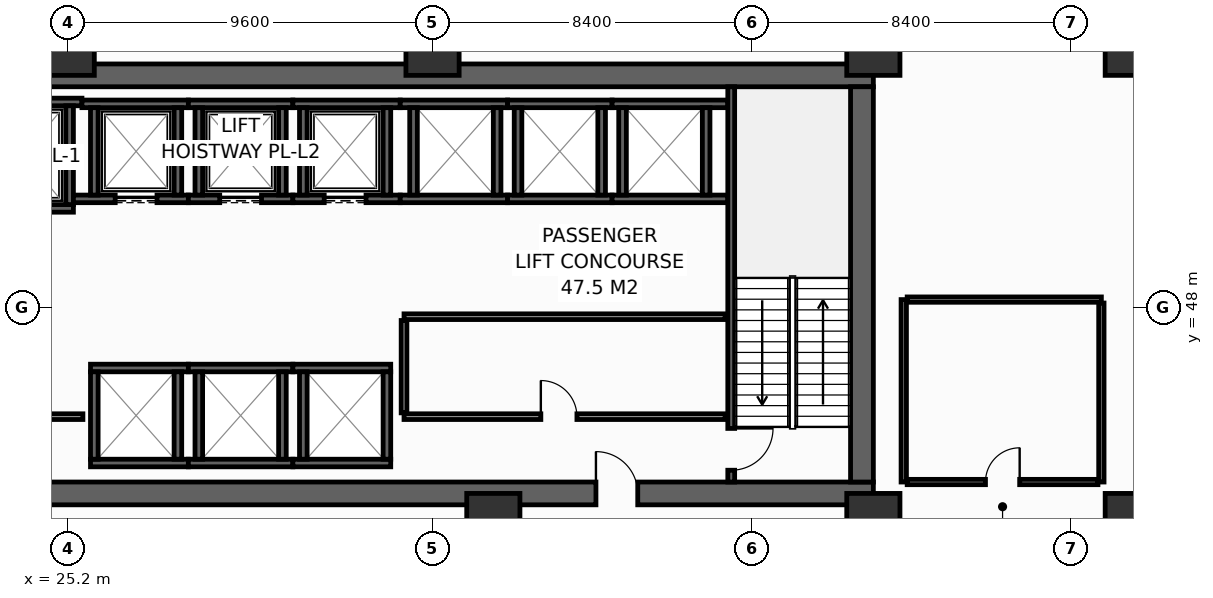
"""IFC4 building model, lengths in metres.
Left out: names, types, materials, properties, quantities, classifications, styles, units other than length and angle.
Written with IfcOpenShell. Run it as: python <this file> out.ifc"""

import sys

from ifc_helpers import new_model, si_unit, direction, frame, frame_2d, origin, origin_2d, place, context, subcontext, project, spatial, rectangle, hollow_rectangle, extrude, element, fill, save


model = new_model("IFC4")
c1 = context("Model", 3, precision=1e-05, world=origin(), true_north=direction((0.0, 1.0)))
c2 = subcontext(c1, "Body", "Model", "MODEL_VIEW")
j1 = project(units=[si_unit("LENGTHUNIT", "METRE"), si_unit("PLANEANGLEUNIT", "RADIAN")], contexts=[c1])
p1 = place(None, origin())
s1 = spatial("IfcSite", under=j1, at=p1, CompositionType="ELEMENT")
p2 = place(p1, origin())
s2 = spatial("IfcBuilding", under=s1, at=p2, CompositionType="ELEMENT")
p3 = place(p2, frame((0.0, 0.0, 6.0)))
s3 = spatial("IfcBuildingStorey", under=s2, at=p3, CompositionType="ELEMENT", Elevation=6.0)
p4 = place(p3, frame((13.5, 43.1, 0.0), z_axis=(0.0, 0.0, 1.0), x_axis=(1.0, 0.0, 0.0)))
e1 = element("IfcWall", 1, at=p4, inside=s3, PredefinedType="SHEAR", context=c2, shape_type="SweptSolid", body=[
    extrude(rectangle(XDim=32.9, YDim=0.6, at=frame_2d((16.45, 0.0))), origin(), (0.0, 0.0, 1.0), 5.1),
])
p5 = place(p4, frame((5.4, 0.0, 0.0)))
e2 = element("IfcOpeningElement", 2, at=p5, cuts=e1, PredefinedType="OPENING", context=c2, shape_type="SweptSolid", body=[
    extrude(rectangle(XDim=1.1, YDim=2.15, at=frame_2d((0.55, 1.075))), frame((0.0, 0.31, 0.0), z_axis=(0.0, -1.0, 0.0), x_axis=(1.0, 0.0, 0.0)), (0.0, 0.0, 1.0), 0.62),
])
p6 = place(p4, frame((25.6, 0.0, 0.0)))
e3 = element("IfcOpeningElement", 3, at=p6, cuts=e1, PredefinedType="OPENING", context=c2, shape_type="SweptSolid", body=[
    extrude(rectangle(XDim=1.1, YDim=2.15, at=frame_2d((0.55, 1.075))), frame((0.0, 0.31, 0.0), z_axis=(0.0, -1.0, 0.0), x_axis=(1.0, 0.0, 0.0)), (0.0, 0.0, 1.0), 0.62),
])
p7 = place(p3, frame((13.5, 54.1, 0.0), z_axis=(0.0, 0.0, 1.0), x_axis=(1.0, 0.0, 0.0)))
e4 = element("IfcWall", 4, at=p7, inside=s3, PredefinedType="SHEAR", context=c2, shape_type="SweptSolid", body=[
    extrude(rectangle(XDim=32.9, YDim=0.6, at=frame_2d((16.45, 0.0))), origin(), (0.0, 0.0, 1.0), 5.1),
])
p8 = place(p3, frame((46.1, 43.4, 0.0), z_axis=(0.0, 0.0, 1.0), x_axis=(0.0, 1.0, 0.0)))
e5 = element("IfcWall", 5, at=p8, inside=s3, PredefinedType="SHEAR", context=c2, shape_type="SweptSolid", body=[
    extrude(rectangle(XDim=10.4, YDim=0.6, at=frame_2d((5.2, 0.0))), origin(), (0.0, 0.0, 1.0), 5.1),
])
for number, where, z_axis, x_axis in (
    (6, (25.2, 54.8, 0.0), (0.0, 0.0, 1.0), (1.0, 0.0, 0.0)),
    (7, (34.8, 54.8, 0.0), (0.0, 0.0, 1.0), (1.0, 0.0, 0.0)),
    (8, (46.4, 54.8, 0.0), (0.0, 0.0, 1.0), (1.0, 0.0, 0.0)),
    (9, (53.2, 54.8, 0.0), (0.0, 0.0, 1.0), (1.0, 0.0, 0.0)),
    (10, (36.4, 42.4, 0.0), (0.0, 0.0, 1.0), (1.0, 0.0, 0.0)),
    (11, (46.4, 42.4, 0.0), (0.0, 0.0, 1.0), (1.0, 0.0, 0.0)),
    (12, (53.2, 42.4, 0.0), (0.0, 0.0, 1.0), (1.0, 0.0, 0.0)),
):
    element("IfcColumn", number, at=place(p3, frame(where, z_axis=z_axis, x_axis=x_axis)), inside=s3, PredefinedType="COLUMN", context=c2, shape_type="SweptSolid", body=[
        extrude(hollow_rectangle(XDim=1.4, YDim=1.4, WallThickness=0.065, at=origin_2d()), origin(), (0.0, 0.0, 1.0), 5.4),
    ])
p9 = place(p3, frame((22.5, 50.6, 0.0), z_axis=(0.0, 0.0, 1.0), x_axis=(1.0, 0.0, 0.0)))
e13 = element("IfcWall", 13, at=p9, inside=s3, PredefinedType="SHEAR", context=c2, shape_type="SweptSolid", body=[
    extrude(rectangle(XDim=2.85, YDim=0.2, at=frame_2d((1.425, 0.0))), origin(), (0.0, 0.0, 1.0), 5.1),
])
p10 = place(p9, frame((0.925, 0.0, 0.0)))
e14 = element("IfcOpeningElement", 14, at=p10, cuts=e13, PredefinedType="OPENING", context=c2, shape_type="SweptSolid", body=[
    extrude(rectangle(XDim=1.25, YDim=2.3, at=frame_2d((0.625, 1.15))), frame((0.0, 0.11, 0.0), z_axis=(0.0, -1.0, 0.0), x_axis=(1.0, 0.0, 0.0)), (0.0, 0.0, 1.0), 0.22),
])
p11 = place(p3, frame((22.5, 53.4, 0.0), z_axis=(0.0, 0.0, 1.0), x_axis=(1.0, 0.0, 0.0)))
e15 = element("IfcWall", 15, at=p11, inside=s3, PredefinedType="SHEAR", context=c2, shape_type="SweptSolid", body=[
    extrude(rectangle(XDim=3.075, YDim=0.2, at=frame_2d((1.538, 0.0))), origin(), (0.0, 0.0, 1.0), 5.1),
])
p12 = place(p3, frame((25.25, 50.7, 0.0), z_axis=(0.0, 0.0, 1.0), x_axis=(0.0, 1.0, 0.0)))
e16 = element("IfcWall", 16, at=p12, inside=s3, PredefinedType="SHEAR", context=c2, shape_type="SweptSolid", body=[
    extrude(rectangle(XDim=2.6, YDim=0.2, at=frame_2d((1.3, 0.0))), origin(), (0.0, 0.0, 1.0), 5.1),
])
p13 = place(p3, frame((25.35, 50.85, 0.0), z_axis=(0.0, 0.0, 1.0), x_axis=(1.0, 0.0, 0.0)))
e17 = element("IfcWall", 17, at=p13, inside=s3, PredefinedType="SHEAR", context=c2, shape_type="SweptSolid", body=[
    extrude(rectangle(XDim=3.025, YDim=0.2, at=frame_2d((1.512, 0.0))), origin(), (0.0, 0.0, 1.0), 5.1),
])
p14 = place(p13, frame((1.1, 0.0, 0.0)))
e18 = element("IfcOpeningElement", 18, at=p14, cuts=e17, PredefinedType="OPENING", context=c2, shape_type="SweptSolid", body=[
    extrude(rectangle(XDim=1.1, YDim=2.2, at=frame_2d((0.55, 1.1))), frame((0.0, 0.11, 0.0), z_axis=(0.0, -1.0, 0.0), x_axis=(1.0, 0.0, 0.0)), (0.0, 0.0, 1.0), 0.22),
])
p15 = place(p3, frame((25.575, 53.35, 0.0), z_axis=(0.0, 0.0, 1.0), x_axis=(1.0, 0.0, 0.0)))
e19 = element("IfcWall", 19, at=p15, inside=s3, PredefinedType="SHEAR", context=c2, shape_type="SweptSolid", body=[
    extrude(rectangle(XDim=2.8, YDim=0.2, at=frame_2d((1.4, 0.0))), origin(), (0.0, 0.0, 1.0), 5.1),
])
for number, where, z_axis, x_axis in (
    (20, (25.9, 50.95, 0.0), (0.0, 0.0, 1.0), (0.0, 1.0, 0.0)),
    (21, (28.1, 50.95, 0.0), (0.0, 0.0, 1.0), (0.0, 1.0, 0.0)),
):
    element("IfcWall", number, at=place(p3, frame(where, z_axis=z_axis, x_axis=x_axis)), inside=s3, PredefinedType="SHEAR", context=c2, shape_type="SweptSolid", body=[
        extrude(rectangle(XDim=2.3, YDim=0.2, at=frame_2d((1.15, 0.0))), origin(), (0.0, 0.0, 1.0), 5.1),
    ])
p16 = place(p3, frame((28.375, 50.85, 0.0), z_axis=(0.0, 0.0, 1.0), x_axis=(1.0, 0.0, 0.0)))
e22 = element("IfcWall", 22, at=p16, inside=s3, PredefinedType="SHEAR", context=c2, shape_type="SweptSolid", body=[
    extrude(rectangle(XDim=2.75, YDim=0.2, at=frame_2d((1.375, 0.0))), origin(), (0.0, 0.0, 1.0), 5.1),
])
p17 = place(p16, frame((0.825, 0.0, 0.0)))
e23 = element("IfcOpeningElement", 23, at=p17, cuts=e22, PredefinedType="OPENING", context=c2, shape_type="SweptSolid", body=[
    extrude(rectangle(XDim=1.1, YDim=2.2, at=frame_2d((0.55, 1.1))), frame((0.0, 0.11, 0.0), z_axis=(0.0, -1.0, 0.0), x_axis=(1.0, 0.0, 0.0)), (0.0, 0.0, 1.0), 0.22),
])
p18 = place(p3, frame((28.375, 53.35, 0.0), z_axis=(0.0, 0.0, 1.0), x_axis=(1.0, 0.0, 0.0)))
e24 = element("IfcWall", 24, at=p18, inside=s3, PredefinedType="SHEAR", context=c2, shape_type="SweptSolid", body=[
    extrude(rectangle(XDim=2.75, YDim=0.2, at=frame_2d((1.375, 0.0))), origin(), (0.0, 0.0, 1.0), 5.1),
])
for number, where, z_axis, x_axis in (
    (25, (28.65, 50.95, 0.0), (0.0, 0.0, 1.0), (0.0, 1.0, 0.0)),
    (26, (30.85, 50.95, 0.0), (0.0, 0.0, 1.0), (0.0, 1.0, 0.0)),
):
    element("IfcWall", number, at=place(p3, frame(where, z_axis=z_axis, x_axis=x_axis)), inside=s3, PredefinedType="SHEAR", context=c2, shape_type="SweptSolid", body=[
        extrude(rectangle(XDim=2.3, YDim=0.2, at=frame_2d((1.15, 0.0))), origin(), (0.0, 0.0, 1.0), 5.1),
    ])
p19 = place(p3, frame((31.125, 50.85, 0.0), z_axis=(0.0, 0.0, 1.0), x_axis=(1.0, 0.0, 0.0)))
e27 = element("IfcWall", 27, at=p19, inside=s3, PredefinedType="SHEAR", context=c2, shape_type="SweptSolid", body=[
    extrude(rectangle(XDim=2.825, YDim=0.2, at=frame_2d((1.413, 0.0))), origin(), (0.0, 0.0, 1.0), 5.1),
])
p20 = place(p19, frame((0.825, 0.0, 0.0)))
e28 = element("IfcOpeningElement", 28, at=p20, cuts=e27, PredefinedType="OPENING", context=c2, shape_type="SweptSolid", body=[
    extrude(rectangle(XDim=1.1, YDim=2.2, at=frame_2d((0.55, 1.1))), frame((0.0, 0.11, 0.0), z_axis=(0.0, -1.0, 0.0), x_axis=(1.0, 0.0, 0.0)), (0.0, 0.0, 1.0), 0.22),
])
p21 = place(p3, frame((31.125, 53.35, 0.0), z_axis=(0.0, 0.0, 1.0), x_axis=(1.0, 0.0, 0.0)))
e29 = element("IfcWall", 29, at=p21, inside=s3, PredefinedType="SHEAR", context=c2, shape_type="SweptSolid", body=[
    extrude(rectangle(XDim=2.825, YDim=0.2, at=frame_2d((1.413, 0.0))), origin(), (0.0, 0.0, 1.0), 5.1),
])
for number, where, z_axis, x_axis in (
    (30, (31.4, 50.95, 0.0), (0.0, 0.0, 1.0), (0.0, 1.0, 0.0)),
    (31, (33.6, 50.95, 0.0), (0.0, 0.0, 1.0), (0.0, 1.0, 0.0)),
):
    element("IfcWall", number, at=place(p3, frame(where, z_axis=z_axis, x_axis=x_axis)), inside=s3, PredefinedType="SHEAR", context=c2, shape_type="SweptSolid", body=[
        extrude(rectangle(XDim=2.3, YDim=0.2, at=frame_2d((1.15, 0.0))), origin(), (0.0, 0.0, 1.0), 5.1),
    ])
for number, where, z_axis, x_axis in (
    (32, (25.8, 43.9, 0.0), (0.0, 0.0, 1.0), (1.0, 0.0, 0.0)),
    (33, (25.8, 46.4, 0.0), (0.0, 0.0, 1.0), (1.0, 0.0, 0.0)),
):
    element("IfcWall", number, at=place(p3, frame(where, z_axis=z_axis, x_axis=x_axis)), inside=s3, PredefinedType="SHEAR", context=c2, shape_type="SweptSolid", body=[
        extrude(rectangle(XDim=2.575, YDim=0.2, at=frame_2d((1.288, 0.0))), origin(), (0.0, 0.0, 1.0), 5.1),
    ])
for number, where, z_axis, x_axis in (
    (34, (25.9, 44.0, 0.0), (0.0, 0.0, 1.0), (0.0, 1.0, 0.0)),
    (35, (28.1, 44.0, 0.0), (0.0, 0.0, 1.0), (0.0, 1.0, 0.0)),
):
    element("IfcWall", number, at=place(p3, frame(where, z_axis=z_axis, x_axis=x_axis)), inside=s3, PredefinedType="SHEAR", context=c2, shape_type="SweptSolid", body=[
        extrude(rectangle(XDim=2.3, YDim=0.2, at=frame_2d((1.15, 0.0))), origin(), (0.0, 0.0, 1.0), 5.1),
    ])
for number, where, z_axis, x_axis in (
    (36, (28.375, 43.9, 0.0), (0.0, 0.0, 1.0), (1.0, 0.0, 0.0)),
    (37, (28.375, 46.4, 0.0), (0.0, 0.0, 1.0), (1.0, 0.0, 0.0)),
):
    element("IfcWall", number, at=place(p3, frame(where, z_axis=z_axis, x_axis=x_axis)), inside=s3, PredefinedType="SHEAR", context=c2, shape_type="SweptSolid", body=[
        extrude(rectangle(XDim=2.75, YDim=0.2, at=frame_2d((1.375, 0.0))), origin(), (0.0, 0.0, 1.0), 5.1),
    ])
for number, where, z_axis, x_axis in (
    (38, (28.65, 44.0, 0.0), (0.0, 0.0, 1.0), (0.0, 1.0, 0.0)),
    (39, (30.85, 44.0, 0.0), (0.0, 0.0, 1.0), (0.0, 1.0, 0.0)),
):
    element("IfcWall", number, at=place(p3, frame(where, z_axis=z_axis, x_axis=x_axis)), inside=s3, PredefinedType="SHEAR", context=c2, shape_type="SweptSolid", body=[
        extrude(rectangle(XDim=2.3, YDim=0.2, at=frame_2d((1.15, 0.0))), origin(), (0.0, 0.0, 1.0), 5.1),
    ])
for number, where, z_axis, x_axis in (
    (40, (31.125, 43.9, 0.0), (0.0, 0.0, 1.0), (1.0, 0.0, 0.0)),
    (41, (31.125, 46.4, 0.0), (0.0, 0.0, 1.0), (1.0, 0.0, 0.0)),
):
    element("IfcWall", number, at=place(p3, frame(where, z_axis=z_axis, x_axis=x_axis)), inside=s3, PredefinedType="SHEAR", context=c2, shape_type="SweptSolid", body=[
        extrude(rectangle(XDim=2.575, YDim=0.2, at=frame_2d((1.288, 0.0))), origin(), (0.0, 0.0, 1.0), 5.1),
    ])
for number, where, z_axis, x_axis in (
    (42, (31.4, 44.0, 0.0), (0.0, 0.0, 1.0), (0.0, 1.0, 0.0)),
    (43, (33.6, 44.0, 0.0), (0.0, 0.0, 1.0), (0.0, 1.0, 0.0)),
):
    element("IfcWall", number, at=place(p3, frame(where, z_axis=z_axis, x_axis=x_axis)), inside=s3, PredefinedType="SHEAR", context=c2, shape_type="SweptSolid", body=[
        extrude(rectangle(XDim=2.3, YDim=0.2, at=frame_2d((1.15, 0.0))), origin(), (0.0, 0.0, 1.0), 5.1),
    ])
for number, where, z_axis, x_axis in (
    (44, (33.95, 50.85, 0.0), (0.0, 0.0, 1.0), (1.0, 0.0, 0.0)),
    (45, (33.95, 53.35, 0.0), (0.0, 0.0, 1.0), (1.0, 0.0, 0.0)),
):
    element("IfcWall", number, at=place(p3, frame(where, z_axis=z_axis, x_axis=x_axis)), inside=s3, PredefinedType="SHEAR", context=c2, shape_type="SweptSolid", body=[
        extrude(rectangle(XDim=2.825, YDim=0.2, at=frame_2d((1.413, 0.0))), origin(), (0.0, 0.0, 1.0), 5.1),
    ])
for number, where, z_axis, x_axis in (
    (46, (34.3, 50.95, 0.0), (0.0, 0.0, 1.0), (0.0, 1.0, 0.0)),
    (47, (36.5, 50.95, 0.0), (0.0, 0.0, 1.0), (0.0, 1.0, 0.0)),
):
    element("IfcWall", number, at=place(p3, frame(where, z_axis=z_axis, x_axis=x_axis)), inside=s3, PredefinedType="SHEAR", context=c2, shape_type="SweptSolid", body=[
        extrude(rectangle(XDim=2.3, YDim=0.2, at=frame_2d((1.15, 0.0))), origin(), (0.0, 0.0, 1.0), 5.1),
    ])
for number, where, z_axis, x_axis in (
    (48, (36.775, 50.85, 0.0), (0.0, 0.0, 1.0), (1.0, 0.0, 0.0)),
    (49, (36.775, 53.35, 0.0), (0.0, 0.0, 1.0), (1.0, 0.0, 0.0)),
):
    element("IfcWall", number, at=place(p3, frame(where, z_axis=z_axis, x_axis=x_axis)), inside=s3, PredefinedType="SHEAR", context=c2, shape_type="SweptSolid", body=[
        extrude(rectangle(XDim=2.75, YDim=0.2, at=frame_2d((1.375, 0.0))), origin(), (0.0, 0.0, 1.0), 5.1),
    ])
for number, where, z_axis, x_axis in (
    (50, (37.05, 50.95, 0.0), (0.0, 0.0, 1.0), (0.0, 1.0, 0.0)),
    (51, (39.25, 50.95, 0.0), (0.0, 0.0, 1.0), (0.0, 1.0, 0.0)),
):
    element("IfcWall", number, at=place(p3, frame(where, z_axis=z_axis, x_axis=x_axis)), inside=s3, PredefinedType="SHEAR", context=c2, shape_type="SweptSolid", body=[
        extrude(rectangle(XDim=2.3, YDim=0.2, at=frame_2d((1.15, 0.0))), origin(), (0.0, 0.0, 1.0), 5.1),
    ])
for number, where, z_axis, x_axis in (
    (52, (39.525, 50.85, 0.0), (0.0, 0.0, 1.0), (1.0, 0.0, 0.0)),
    (53, (39.525, 53.35, 0.0), (0.0, 0.0, 1.0), (1.0, 0.0, 0.0)),
):
    element("IfcWall", number, at=place(p3, frame(where, z_axis=z_axis, x_axis=x_axis)), inside=s3, PredefinedType="SHEAR", context=c2, shape_type="SweptSolid", body=[
        extrude(rectangle(XDim=3.045, YDim=0.2, at=frame_2d((1.522, 0.0))), origin(), (0.0, 0.0, 1.0), 5.1),
    ])
for number, where, z_axis, x_axis in (
    (54, (39.8, 50.95, 0.0), (0.0, 0.0, 1.0), (0.0, 1.0, 0.0)),
    (55, (42.0, 50.95, 0.0), (0.0, 0.0, 1.0), (0.0, 1.0, 0.0)),
):
    element("IfcWall", number, at=place(p3, frame(where, z_axis=z_axis, x_axis=x_axis)), inside=s3, PredefinedType="SHEAR", context=c2, shape_type="SweptSolid", body=[
        extrude(rectangle(XDim=2.3, YDim=0.2, at=frame_2d((1.15, 0.0))), origin(), (0.0, 0.0, 1.0), 5.1),
    ])
p22 = place(p3, frame((42.66, 53.8, 0.0), z_axis=(0.0, 0.0, 1.0), x_axis=(0.0, -1.0, 0.0)))
e56 = element("IfcWall", 56, at=p22, inside=s3, PredefinedType="SHEAR", context=c2, shape_type="SweptSolid", body=[
    extrude(rectangle(XDim=10.4, YDim=0.18, at=frame_2d((5.2, 0.0))), origin(), (0.0, 0.0, 1.0), 5.1),
])
p23 = place(p22, frame((8.99, 0.0, 0.0)))
e57 = element("IfcOpeningElement", 57, at=p23, cuts=e56, PredefinedType="OPENING", context=c2, shape_type="SweptSolid", body=[
    extrude(rectangle(XDim=1.1, YDim=2.15, at=frame_2d((0.55, 1.075))), frame((0.0, 0.1, 0.0), z_axis=(0.0, -1.0, 0.0), x_axis=(1.0, 0.0, 0.0)), (0.0, 0.0, 1.0), 0.2),
])
p24 = place(p3, frame((22.68, 45.12, 0.0), z_axis=(0.0, 0.0, 1.0), x_axis=(1.0, 0.0, 0.0)))
e58 = element("IfcWall", 58, at=p24, inside=s3, PredefinedType="PARTITIONING", context=c2, shape_type="SweptSolid", body=[
    extrude(rectangle(XDim=2.92, YDim=0.15, at=frame_2d((1.46, 0.0))), origin(), (0.0, 0.0, 1.0), 5.1),
])
p25 = place(p24, frame((0.85, 0.0, 0.0)))
e59 = element("IfcOpeningElement", 59, at=p25, cuts=e58, PredefinedType="OPENING", context=c2, shape_type="SweptSolid", body=[
    extrude(rectangle(XDim=1.1, YDim=2.15, at=frame_2d((0.55, 1.075))), frame((0.0, 0.085, 0.0), z_axis=(0.0, -1.0, 0.0), x_axis=(1.0, 0.0, 0.0)), (0.0, 0.0, 1.0), 0.17),
])
p26 = place(p3, frame((34.05, 45.12, 0.0), z_axis=(0.0, 0.0, 1.0), x_axis=(1.0, 0.0, 0.0)))
e60 = element("IfcWall", 60, at=p26, inside=s3, PredefinedType="PARTITIONING", context=c2, shape_type="SweptSolid", body=[
    extrude(rectangle(XDim=8.45, YDim=0.15, at=frame_2d((4.225, 0.0))), origin(), (0.0, 0.0, 1.0), 5.1),
])
p27 = place(p26, frame((3.6, 0.0, 0.0)))
e61 = element("IfcOpeningElement", 61, at=p27, cuts=e60, PredefinedType="OPENING", context=c2, shape_type="SweptSolid", body=[
    extrude(rectangle(XDim=0.95, YDim=2.15, at=frame_2d((0.475, 1.075))), frame((0.0, 0.085, 0.0), z_axis=(0.0, -1.0, 0.0), x_axis=(1.0, 0.0, 0.0)), (0.0, 0.0, 1.0), 0.17),
])
p28 = place(p3, frame((34.05, 47.75, 0.0), z_axis=(0.0, 0.0, 1.0), x_axis=(1.0, 0.0, 0.0)))
e62 = element("IfcWall", 62, at=p28, inside=s3, PredefinedType="PARTITIONING", context=c2, shape_type="SweptSolid", body=[
    extrude(rectangle(XDim=8.45, YDim=0.15, at=frame_2d((4.225, 0.0))), origin(), (0.0, 0.0, 1.0), 5.1),
])
p29 = place(p3, frame((34.05, 45.22, 0.0), z_axis=(0.0, 0.0, 1.0), x_axis=(0.0, 1.0, 0.0)))
e63 = element("IfcWall", 63, at=p29, inside=s3, PredefinedType="PARTITIONING", context=c2, shape_type="SweptSolid", body=[
    extrude(rectangle(XDim=2.43, YDim=0.15, at=frame_2d((1.215, 0.0))), origin(), (0.0, 0.0, 1.0), 5.1),
])
p30 = place(p3, frame((47.2, 43.4, 0.0), z_axis=(0.0, 0.0, 1.0), x_axis=(0.0, 1.0, 0.0)))
e64 = element("IfcWall", 64, at=p30, inside=s3, PredefinedType="PARTITIONING", context=c2, shape_type="SweptSolid", body=[
    extrude(rectangle(XDim=4.8, YDim=0.14, at=frame_2d((2.4, 0.0))), origin(), (0.0, 0.0, 1.0), 5.1),
])
p31 = place(p3, frame((47.29, 48.2, 0.0), z_axis=(0.0, 0.0, 1.0), x_axis=(1.0, 0.0, 0.0)))
e65 = element("IfcWall", 65, at=p31, inside=s3, PredefinedType="PARTITIONING", context=c2, shape_type="SweptSolid", body=[
    extrude(rectangle(XDim=5.11, YDim=0.14, at=frame_2d((2.555, 0.0))), origin(), (0.0, 0.0, 1.0), 5.1),
])
p32 = place(p3, frame((52.4, 43.4, 0.0), z_axis=(0.0, 0.0, 1.0), x_axis=(0.0, 1.0, 0.0)))
e66 = element("IfcWall", 66, at=p32, inside=s3, PredefinedType="PARTITIONING", context=c2, shape_type="SweptSolid", body=[
    extrude(rectangle(XDim=4.71, YDim=0.14, at=frame_2d((2.355, 0.0))), origin(), (0.0, 0.0, 1.0), 5.1),
])
p33 = place(p3, frame((47.29, 43.4, 0.0), z_axis=(0.0, 0.0, 1.0), x_axis=(1.0, 0.0, 0.0)))
e67 = element("IfcWall", 67, at=p33, inside=s3, PredefinedType="PARTITIONING", context=c2, shape_type="SweptSolid", body=[
    extrude(rectangle(XDim=5.02, YDim=0.14, at=frame_2d((2.51, 0.0))), origin(), (0.0, 0.0, 1.0), 5.1),
])
p34 = place(p33, frame((2.06, 0.0, 0.0)))
e68 = element("IfcOpeningElement", 68, at=p34, cuts=e67, PredefinedType="OPENING", context=c2, shape_type="SweptSolid", body=[
    extrude(rectangle(XDim=0.9, YDim=2.1, at=frame_2d((0.45, 1.05))), frame((0.0, 0.08, 0.0), z_axis=(0.0, -1.0, 0.0), x_axis=(1.0, 0.0, 0.0)), (0.0, 0.0, 1.0), 0.16),
])
p35 = place(p14, origin())
e69 = element("IfcDoor", 69, at=p35, inside=s3, OperationType="SLIDING_TO_LEFT", PredefinedType="DOOR", context=c2, shape_type="SweptSolid", body=[
    extrude(rectangle(XDim=1.1, YDim=2.2, at=frame_2d((0.55, 1.1))), frame((0.0, 0.025, 0.0), z_axis=(0.0, -1.0, 0.0), x_axis=(1.0, 0.0, 0.0)), (0.0, 0.0, 1.0), 0.05),
])
fill(e18, e69)
p36 = place(p17, origin())
e70 = element("IfcDoor", 70, at=p36, inside=s3, OperationType="SLIDING_TO_LEFT", PredefinedType="DOOR", context=c2, shape_type="SweptSolid", body=[
    extrude(rectangle(XDim=1.1, YDim=2.2, at=frame_2d((0.55, 1.1))), frame((0.0, 0.025, 0.0), z_axis=(0.0, -1.0, 0.0), x_axis=(1.0, 0.0, 0.0)), (0.0, 0.0, 1.0), 0.05),
])
fill(e23, e70)
p37 = place(p20, origin())
e71 = element("IfcDoor", 71, at=p37, inside=s3, OperationType="SLIDING_TO_LEFT", PredefinedType="DOOR", context=c2, shape_type="SweptSolid", body=[
    extrude(rectangle(XDim=1.1, YDim=2.2, at=frame_2d((0.55, 1.1))), frame((0.0, 0.025, 0.0), z_axis=(0.0, -1.0, 0.0), x_axis=(1.0, 0.0, 0.0)), (0.0, 0.0, 1.0), 0.05),
])
fill(e28, e71)
p38 = place(p23, origin())
e72 = element("IfcDoor", 72, at=p38, inside=s3, OperationType="SINGLE_SWING_LEFT", PredefinedType="DOOR", context=c2, shape_type="SweptSolid", body=[
    extrude(rectangle(XDim=1.1, YDim=2.15, at=frame_2d((0.55, 1.075))), frame((0.0, 0.025, 0.0), z_axis=(0.0, -1.0, 0.0), x_axis=(1.0, 0.0, 0.0)), (0.0, 0.0, 1.0), 0.05),
])
fill(e57, e72)
p39 = place(p6, origin())
e73 = element("IfcDoor", 73, at=p39, inside=s3, OperationType="SINGLE_SWING_LEFT", PredefinedType="DOOR", context=c2, shape_type="SweptSolid", body=[
    extrude(rectangle(XDim=1.1, YDim=2.15, at=frame_2d((0.55, 1.075))), frame((0.0, 0.025, 0.0), z_axis=(0.0, -1.0, 0.0), x_axis=(1.0, 0.0, 0.0)), (0.0, 0.0, 1.0), 0.05),
])
fill(e3, e73)
p40 = place(p27, origin())
e74 = element("IfcDoor", 74, at=p40, inside=s3, OperationType="SINGLE_SWING_LEFT", PredefinedType="DOOR", context=c2, shape_type="SweptSolid", body=[
    extrude(rectangle(XDim=0.95, YDim=2.15, at=frame_2d((0.475, 1.075))), frame((0.0, 0.025, 0.0), z_axis=(0.0, -1.0, 0.0), x_axis=(1.0, 0.0, 0.0)), (0.0, 0.0, 1.0), 0.05),
])
fill(e61, e74)
p41 = place(p34, origin())
e75 = element("IfcDoor", 75, at=p41, inside=s3, OperationType="SINGLE_SWING_RIGHT", PredefinedType="DOOR", context=c2, shape_type="SweptSolid", body=[
    extrude(rectangle(XDim=0.9, YDim=2.1, at=frame_2d((0.45, 1.05))), frame((0.0, 0.025, 0.0), z_axis=(0.0, -1.0, 0.0), x_axis=(1.0, 0.0, 0.0)), (0.0, 0.0, 1.0), 0.05),
])
fill(e68, e75)
save(model, sys.argv[1])
